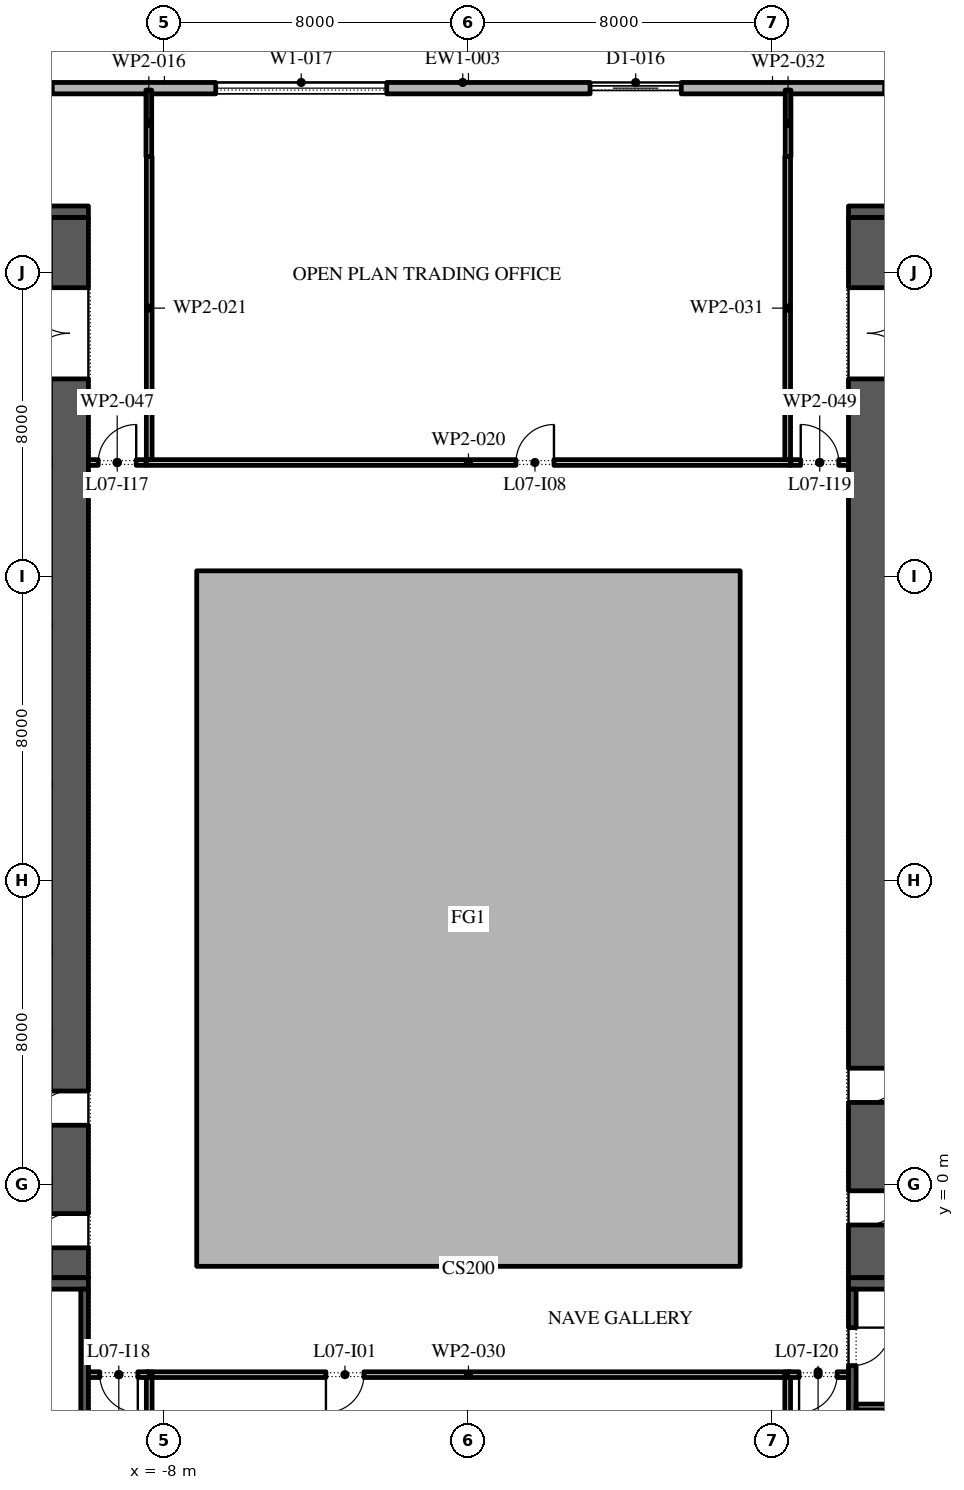
"""IFC4 building model, lengths in metres.
Left out: names, types, materials, properties, quantities, classifications, styles, units other than length and angle.
Written with IfcOpenShell. Run it as: python <this file> out.ifc"""

import sys

from ifc_helpers import new_model, si_unit, direction, frame, frame_2d, origin, place, context, subcontext, project, spatial, polyline, rectangle, outline, extrude, element, fill, save


model = new_model("IFC4")
c1 = context("Model", 3, precision=1e-05, world=origin(), true_north=direction((0.0, 1.0)))
c2 = subcontext(c1, "Body", "Model", "MODEL_VIEW")
j1 = project(units=[si_unit("LENGTHUNIT", "METRE"), si_unit("PLANEANGLEUNIT", "RADIAN")], contexts=[c1])
p1 = place(None, origin())
s1 = spatial("IfcSite", under=j1, at=p1, CompositionType="ELEMENT")
p2 = place(p1, origin())
s2 = spatial("IfcBuilding", under=s1, at=p2, CompositionType="ELEMENT")
p3 = place(p2, frame((0.0, 0.0, 39.6)))
s3 = spatial("IfcBuildingStorey", under=s2, at=p3, CompositionType="ELEMENT", Elevation=39.6)
p4 = place(p3, origin())
e1 = element("IfcWall", 1, at=p4, inside=s3, PredefinedType="STANDARD", context=c2, shape_type="SweptSolid", body=[
    extrude(outline(polyline([(-7.15, -2.15), (7.15, -2.15), (7.15, 16.15), (-7.15, 16.15), (-7.15, -2.15)]), holes=[polyline([(-7.0, -2.0), (-7.0, 16.0), (7.0, 16.0), (7.0, -2.0), (-7.0, -2.0)])]), origin(), (0.0, 0.0, 1.0), 4.0),
])
p5 = place(p3, frame((26.1, 28.85, 0.0), z_axis=(0.0, 0.0, 1.0), x_axis=(-1.0, 0.0, 0.0)))
e2 = element("IfcWall", 2, at=p5, inside=s3, PredefinedType="STANDARD", context=c2, shape_type="SweptSolid", body=[
    extrude(rectangle(XDim=52.5, YDim=0.3, at=frame_2d((26.25, 0.0))), origin(), (0.0, 0.0, 1.0), 4.0),
])
p6 = place(p5, frame((2.0, 0.0, 0.45)))
e3 = element("IfcOpeningElement", 3, at=p6, cuts=e2, PredefinedType="OPENING", context=c2, shape_type="SweptSolid", body=[
    extrude(rectangle(XDim=4.5, YDim=3.05, at=frame_2d((2.25, 1.525))), frame((0.0, 0.16, 0.0), z_axis=(0.0, -1.0, 0.0), x_axis=(1.0, 0.0, 0.0)), (0.0, 0.0, 1.0), 0.32),
])
p7 = place(p5, frame((10.65, 0.0, 0.45)))
e4 = element("IfcOpeningElement", 4, at=p7, cuts=e2, PredefinedType="OPENING", context=c2, shape_type="SweptSolid", body=[
    extrude(rectangle(XDim=4.5, YDim=3.05, at=frame_2d((2.25, 1.525))), frame((0.0, 0.16, 0.0), z_axis=(0.0, -1.0, 0.0), x_axis=(1.0, 0.0, 0.0)), (0.0, 0.0, 1.0), 0.32),
])
p8 = place(p5, frame((20.5, 0.0, 0.0)))
e5 = element("IfcOpeningElement", 5, at=p8, cuts=e2, PredefinedType="OPENING", context=c2, shape_type="SweptSolid", body=[
    extrude(rectangle(XDim=2.4, YDim=3.5, at=frame_2d((1.2, 1.75))), frame((0.0, 0.16, 0.0), z_axis=(0.0, -1.0, 0.0), x_axis=(1.0, 0.0, 0.0)), (0.0, 0.0, 1.0), 0.32),
])
p9 = place(p5, frame((28.25, 0.0, 0.45)))
e6 = element("IfcOpeningElement", 6, at=p9, cuts=e2, PredefinedType="OPENING", context=c2, shape_type="SweptSolid", body=[
    extrude(rectangle(XDim=4.5, YDim=3.05, at=frame_2d((2.25, 1.525))), frame((0.0, 0.16, 0.0), z_axis=(0.0, -1.0, 0.0), x_axis=(1.0, 0.0, 0.0)), (0.0, 0.0, 1.0), 0.32),
])
p10 = place(p5, frame((37.05, 0.0, 0.45)))
e7 = element("IfcOpeningElement", 7, at=p10, cuts=e2, PredefinedType="OPENING", context=c2, shape_type="SweptSolid", body=[
    extrude(rectangle(XDim=4.5, YDim=3.05, at=frame_2d((2.25, 1.525))), frame((0.0, 0.16, 0.0), z_axis=(0.0, -1.0, 0.0), x_axis=(1.0, 0.0, 0.0)), (0.0, 0.0, 1.0), 0.32),
])
p11 = place(p5, frame((45.85, 0.0, 0.45)))
e8 = element("IfcOpeningElement", 8, at=p11, cuts=e2, PredefinedType="OPENING", context=c2, shape_type="SweptSolid", body=[
    extrude(rectangle(XDim=4.5, YDim=3.05, at=frame_2d((2.25, 1.525))), frame((0.0, 0.16, 0.0), z_axis=(0.0, -1.0, 0.0), x_axis=(1.0, 0.0, 0.0)), (0.0, 0.0, 1.0), 0.32),
])
p12 = place(p3, frame((-10.5, -2.45, 0.0), z_axis=(0.0, 0.0, 1.0), x_axis=(0.0, 1.0, 0.0)))
e9 = element("IfcWall", 9, at=p12, inside=s3, PredefinedType="SHEAR", context=c2, shape_type="SweptSolid", body=[
    extrude(rectangle(XDim=27.9, YDim=1.0, at=frame_2d((13.95, 0.0))), origin(), (0.0, 0.0, 1.0), 4.0),
])
p13 = place(p12, frame((23.65, 0.0, 0.0)))
e10 = element("IfcOpeningElement", 10, at=p13, cuts=e9, PredefinedType="OPENING", context=c2, shape_type="SweptSolid", body=[
    extrude(rectangle(XDim=2.4, YDim=2.1, at=frame_2d((1.2, 1.05))), frame((0.0, 0.51, 0.0), z_axis=(0.0, -1.0, 0.0), x_axis=(1.0, 0.0, 0.0)), (0.0, 0.0, 1.0), 1.02),
])
p14 = place(p12, frame((0.788, 0.0, 0.0)))
e11 = element("IfcOpeningElement", 11, at=p14, cuts=e9, PredefinedType="OPENING", context=c2, shape_type="SweptSolid", body=[
    extrude(rectangle(XDim=0.9, YDim=2.1, at=frame_2d((0.45, 1.05))), frame((0.0, 0.51, 0.0), z_axis=(0.0, -1.0, 0.0), x_axis=(1.0, 0.0, 0.0)), (0.0, 0.0, 1.0), 1.02),
])
p15 = place(p12, frame((4.012, 0.0, 0.0)))
e12 = element("IfcOpeningElement", 12, at=p15, cuts=e9, PredefinedType="OPENING", context=c2, shape_type="SweptSolid", body=[
    extrude(rectangle(XDim=0.9, YDim=2.1, at=frame_2d((0.45, 1.05))), frame((0.0, 0.51, 0.0), z_axis=(0.0, -1.0, 0.0), x_axis=(1.0, 0.0, 0.0)), (0.0, 0.0, 1.0), 1.02),
])
for number, where, z_axis, x_axis in (
    (13, (-22.0, -2.6, 0.0), (0.0, 0.0, 1.0), (1.0, 0.0, 0.0)),
    (14, (-22.0, 25.6, 0.0), (0.0, 0.0, 1.0), (1.0, 0.0, 0.0)),
):
    element("IfcWall", number, at=place(p3, frame(where, z_axis=z_axis, x_axis=x_axis)), inside=s3, PredefinedType="SHEAR", context=c2, shape_type="SweptSolid", body=[
        extrude(rectangle(XDim=12.0, YDim=0.3, at=frame_2d((6.0, 0.0))), origin(), (0.0, 0.0, 1.0), 4.0),
    ])
p16 = place(p3, frame((-10.1, -15.8, 0.0), z_axis=(0.0, 0.0, 1.0), x_axis=(0.0, 1.0, 0.0)))
e15 = element("IfcWall", 15, at=p16, inside=s3, PredefinedType="SHEAR", context=c2, shape_type="SweptSolid", body=[
    extrude(rectangle(XDim=13.05, YDim=0.2, at=frame_2d((6.525, 0.0))), origin(), (0.0, 0.0, 1.0), 4.0),
])
p17 = place(p16, frame((6.075, 0.0, 0.0)))
e16 = element("IfcOpeningElement", 16, at=p17, cuts=e15, PredefinedType="OPENING", context=c2, shape_type="SweptSolid", body=[
    extrude(rectangle(XDim=0.9, YDim=2.1, at=frame_2d((0.45, 1.05))), frame((0.0, 0.11, 0.0), z_axis=(0.0, -1.0, 0.0), x_axis=(1.0, 0.0, 0.0)), (0.0, 0.0, 1.0), 0.22),
])
p18 = place(p3, frame((10.5, -2.45, 0.0), z_axis=(0.0, 0.0, 1.0), x_axis=(0.0, 1.0, 0.0)))
e17 = element("IfcWall", 17, at=p18, inside=s3, PredefinedType="SHEAR", context=c2, shape_type="SweptSolid", body=[
    extrude(rectangle(XDim=27.9, YDim=1.0, at=frame_2d((13.95, 0.0))), origin(), (0.0, 0.0, 1.0), 4.0),
])
p19 = place(p18, frame((23.65, 0.0, 0.0)))
e18 = element("IfcOpeningElement", 18, at=p19, cuts=e17, PredefinedType="OPENING", context=c2, shape_type="SweptSolid", body=[
    extrude(rectangle(XDim=2.4, YDim=2.1, at=frame_2d((1.2, 1.05))), frame((0.0, 0.51, 0.0), z_axis=(0.0, -1.0, 0.0), x_axis=(1.0, 0.0, 0.0)), (0.0, 0.0, 1.0), 1.02),
])
p20 = place(p18, frame((1.387, 0.0, 0.0)))
e19 = element("IfcOpeningElement", 19, at=p20, cuts=e17, PredefinedType="OPENING", context=c2, shape_type="SweptSolid", body=[
    extrude(rectangle(XDim=0.9, YDim=2.1, at=frame_2d((0.45, 1.05))), frame((0.0, 0.51, 0.0), z_axis=(0.0, -1.0, 0.0), x_axis=(1.0, 0.0, 0.0)), (0.0, 0.0, 1.0), 1.02),
])
p21 = place(p18, frame((4.613, 0.0, 0.0)))
e20 = element("IfcOpeningElement", 20, at=p21, cuts=e17, PredefinedType="OPENING", context=c2, shape_type="SweptSolid", body=[
    extrude(rectangle(XDim=0.9, YDim=2.1, at=frame_2d((0.45, 1.05))), frame((0.0, 0.51, 0.0), z_axis=(0.0, -1.0, 0.0), x_axis=(1.0, 0.0, 0.0)), (0.0, 0.0, 1.0), 1.02),
])
for number, where, z_axis, x_axis in (
    (21, (10.0, -2.6, 0.0), (0.0, 0.0, 1.0), (1.0, 0.0, 0.0)),
    (22, (10.0, 25.6, 0.0), (0.0, 0.0, 1.0), (1.0, 0.0, 0.0)),
):
    element("IfcWall", number, at=place(p3, frame(where, z_axis=z_axis, x_axis=x_axis)), inside=s3, PredefinedType="SHEAR", context=c2, shape_type="SweptSolid", body=[
        extrude(rectangle(XDim=12.0, YDim=0.3, at=frame_2d((6.0, 0.0))), origin(), (0.0, 0.0, 1.0), 4.0),
    ])
p22 = place(p3, frame((10.1, -15.8, 0.0), z_axis=(0.0, 0.0, 1.0), x_axis=(0.0, 1.0, 0.0)))
e23 = element("IfcWall", 23, at=p22, inside=s3, PredefinedType="SHEAR", context=c2, shape_type="SweptSolid", body=[
    extrude(rectangle(XDim=13.05, YDim=0.2, at=frame_2d((6.525, 0.0))), origin(), (0.0, 0.0, 1.0), 4.0),
])
p23 = place(p22, frame((4.488, 0.0, 0.0)))
e24 = element("IfcOpeningElement", 24, at=p23, cuts=e23, PredefinedType="OPENING", context=c2, shape_type="SweptSolid", body=[
    extrude(rectangle(XDim=0.9, YDim=2.1, at=frame_2d((0.45, 1.05))), frame((0.0, 0.11, 0.0), z_axis=(0.0, -1.0, 0.0), x_axis=(1.0, 0.0, 0.0)), (0.0, 0.0, 1.0), 0.22),
])
p24 = place(p22, frame((11.038, 0.0, 0.0)))
e25 = element("IfcOpeningElement", 25, at=p24, cuts=e23, PredefinedType="OPENING", context=c2, shape_type="SweptSolid", body=[
    extrude(rectangle(XDim=1.0, YDim=2.1, at=frame_2d((0.5, 1.05))), frame((0.0, 0.11, 0.0), z_axis=(0.0, -1.0, 0.0), x_axis=(1.0, 0.0, 0.0)), (0.0, 0.0, 1.0), 0.22),
])
p25 = place(p3, frame((10.2, -5.85, 0.0), z_axis=(0.0, 0.0, 1.0), x_axis=(1.0, 0.0, 0.0)))
e26 = element("IfcWall", 26, at=p25, inside=s3, PredefinedType="PARTITIONING", context=c2, shape_type="SweptSolid", body=[
    extrude(rectangle(XDim=11.6, YDim=0.15, at=frame_2d((5.8, 0.0))), origin(), (0.0, 0.0, 1.0), 4.0),
])
p26 = place(p3, frame((-8.41, 28.8, 0.0), z_axis=(0.0, 0.0, 1.0), x_axis=(0.0, -1.0, 0.0)))
e27 = element("IfcWall", 27, at=p26, inside=s3, PredefinedType="PARTITIONING", context=c2, shape_type="SweptSolid", body=[
    extrude(rectangle(XDim=1.75, YDim=0.15, at=frame_2d((0.875, 0.0))), origin(), (0.0, 0.0, 1.0), 4.0),
])
p27 = place(p3, frame((-8.4, -4.925, 0.0), z_axis=(0.0, 0.0, 1.0), x_axis=(0.0, -1.0, 0.0)))
e28 = element("IfcWall", 28, at=p27, inside=s3, PredefinedType="PARTITIONING", context=c2, shape_type="SweptSolid", body=[
    extrude(rectangle(XDim=5.195, YDim=0.15, at=frame_2d((2.598, 0.0))), origin(), (0.0, 0.0, 1.0), 4.0),
])
p28 = place(p3, frame((-8.475, 19.0, 0.0), z_axis=(0.0, 0.0, 1.0), x_axis=(1.0, 0.0, 0.0)))
e29 = element("IfcWall", 29, at=p28, inside=s3, PredefinedType="PARTITIONING", context=c2, shape_type="SweptSolid", body=[
    extrude(rectangle(XDim=16.95, YDim=0.15, at=frame_2d((8.475, 0.0))), origin(), (0.0, 0.0, 1.0), 4.0),
])
p29 = place(p28, frame((9.725, 0.0, 0.0)))
e30 = element("IfcOpeningElement", 30, at=p29, cuts=e29, PredefinedType="OPENING", context=c2, shape_type="SweptSolid", body=[
    extrude(rectangle(XDim=1.0, YDim=2.1, at=frame_2d((0.5, 1.05))), frame((0.0, 0.085, 0.0), z_axis=(0.0, -1.0, 0.0), x_axis=(1.0, 0.0, 0.0)), (0.0, 0.0, 1.0), 0.17),
])
p30 = place(p3, frame((-8.4, 27.05, 0.0), z_axis=(0.0, 0.0, 1.0), x_axis=(0.0, -1.0, 0.0)))
e31 = element("IfcWall", 31, at=p30, inside=s3, PredefinedType="PARTITIONING", context=c2, shape_type="SweptSolid", body=[
    extrude(rectangle(XDim=7.975, YDim=0.15, at=frame_2d((3.988, 0.0))), origin(), (0.0, 0.0, 1.0), 4.0),
])
p31 = place(p3, frame((8.4, -10.12, 0.0), z_axis=(0.0, 0.0, 1.0), x_axis=(0.0, 1.0, 0.0)))
e32 = element("IfcWall", 32, at=p31, inside=s3, PredefinedType="PARTITIONING", context=c2, shape_type="SweptSolid", body=[
    extrude(rectangle(XDim=5.195, YDim=0.15, at=frame_2d((2.598, 0.0))), origin(), (0.0, 0.0, 1.0), 4.0),
])
p32 = place(p3, frame((8.325, -5.0, 0.0), z_axis=(0.0, 0.0, 1.0), x_axis=(-1.0, 0.0, 0.0)))
e33 = element("IfcWall", 33, at=p32, inside=s3, PredefinedType="PARTITIONING", context=c2, shape_type="SweptSolid", body=[
    extrude(rectangle(XDim=16.65, YDim=0.15, at=frame_2d((8.325, 0.0))), origin(), (0.0, 0.0, 1.0), 4.0),
])
p33 = place(p32, frame((11.075, 0.0, 0.0)))
e34 = element("IfcOpeningElement", 34, at=p33, cuts=e33, PredefinedType="OPENING", context=c2, shape_type="SweptSolid", body=[
    extrude(rectangle(XDim=1.0, YDim=2.1, at=frame_2d((0.5, 1.05))), frame((0.0, 0.085, 0.0), z_axis=(0.0, -1.0, 0.0), x_axis=(1.0, 0.0, 0.0)), (0.0, 0.0, 1.0), 0.17),
])
p34 = place(p3, frame((8.4, 19.075, 0.0), z_axis=(0.0, 0.0, 1.0), x_axis=(0.0, 1.0, 0.0)))
e35 = element("IfcWall", 35, at=p34, inside=s3, PredefinedType="PARTITIONING", context=c2, shape_type="SweptSolid", body=[
    extrude(rectangle(XDim=7.975, YDim=0.15, at=frame_2d((3.988, 0.0))), origin(), (0.0, 0.0, 1.0), 4.0),
])
p35 = place(p3, frame((8.41, 27.05, 0.0), z_axis=(0.0, 0.0, 1.0), x_axis=(0.0, 1.0, 0.0)))
e36 = element("IfcWall", 36, at=p35, inside=s3, PredefinedType="PARTITIONING", context=c2, shape_type="SweptSolid", body=[
    extrude(rectangle(XDim=1.75, YDim=0.15, at=frame_2d((0.875, 0.0))), origin(), (0.0, 0.0, 1.0), 4.0),
])
p36 = place(p3, frame((-10.0, 19.0, 0.0), z_axis=(0.0, 0.0, 1.0), x_axis=(1.0, 0.0, 0.0)))
e37 = element("IfcWall", 37, at=p36, inside=s3, PredefinedType="PARTITIONING", context=c2, shape_type="SweptSolid", body=[
    extrude(rectangle(XDim=1.515, YDim=0.15, at=frame_2d((0.757, 0.0))), origin(), (0.0, 0.0, 1.0), 4.0),
])
p37 = place(p36, frame((0.258, 0.0, 0.0)))
e38 = element("IfcOpeningElement", 38, at=p37, cuts=e37, PredefinedType="OPENING", context=c2, shape_type="SweptSolid", body=[
    extrude(rectangle(XDim=1.0, YDim=2.1, at=frame_2d((0.5, 1.05))), frame((0.0, 0.085, 0.0), z_axis=(0.0, -1.0, 0.0), x_axis=(1.0, 0.0, 0.0)), (0.0, 0.0, 1.0), 0.17),
])
p38 = place(p3, frame((-8.4, -5.0, 0.0), z_axis=(0.0, 0.0, 1.0), x_axis=(-1.0, 0.0, 0.0)))
e39 = element("IfcWall", 39, at=p38, inside=s3, PredefinedType="PARTITIONING", context=c2, shape_type="SweptSolid", body=[
    extrude(rectangle(XDim=1.6, YDim=0.15, at=frame_2d((0.8, 0.0))), origin(), (0.0, 0.0, 1.0), 4.0),
])
p39 = place(p38, frame((0.3, 0.0, 0.0)))
e40 = element("IfcOpeningElement", 40, at=p39, cuts=e39, PredefinedType="OPENING", context=c2, shape_type="SweptSolid", body=[
    extrude(rectangle(XDim=1.0, YDim=2.1, at=frame_2d((0.5, 1.05))), frame((0.0, 0.085, 0.0), z_axis=(0.0, -1.0, 0.0), x_axis=(1.0, 0.0, 0.0)), (0.0, 0.0, 1.0), 0.17),
])
p40 = place(p3, frame((8.485, 19.0, 0.0), z_axis=(0.0, 0.0, 1.0), x_axis=(1.0, 0.0, 0.0)))
e41 = element("IfcWall", 41, at=p40, inside=s3, PredefinedType="PARTITIONING", context=c2, shape_type="SweptSolid", body=[
    extrude(rectangle(XDim=1.515, YDim=0.15, at=frame_2d((0.757, 0.0))), origin(), (0.0, 0.0, 1.0), 4.0),
])
p41 = place(p40, frame((0.258, 0.0, 0.0)))
e42 = element("IfcOpeningElement", 42, at=p41, cuts=e41, PredefinedType="OPENING", context=c2, shape_type="SweptSolid", body=[
    extrude(rectangle(XDim=1.0, YDim=2.1, at=frame_2d((0.5, 1.05))), frame((0.0, 0.085, 0.0), z_axis=(0.0, -1.0, 0.0), x_axis=(1.0, 0.0, 0.0)), (0.0, 0.0, 1.0), 0.17),
])
p42 = place(p3, frame((10.0, -5.0, 0.0), z_axis=(0.0, 0.0, 1.0), x_axis=(-1.0, 0.0, 0.0)))
e43 = element("IfcWall", 43, at=p42, inside=s3, PredefinedType="PARTITIONING", context=c2, shape_type="SweptSolid", body=[
    extrude(rectangle(XDim=1.6, YDim=0.15, at=frame_2d((0.8, 0.0))), origin(), (0.0, 0.0, 1.0), 4.0),
])
p43 = place(p42, frame((0.3, 0.0, 0.0)))
e44 = element("IfcOpeningElement", 44, at=p43, cuts=e43, PredefinedType="OPENING", context=c2, shape_type="SweptSolid", body=[
    extrude(rectangle(XDim=1.0, YDim=2.1, at=frame_2d((0.5, 1.05))), frame((0.0, 0.085, 0.0), z_axis=(0.0, -1.0, 0.0), x_axis=(1.0, 0.0, 0.0)), (0.0, 0.0, 1.0), 0.17),
])
p44 = place(p8, origin())
e45 = element("IfcDoor", 45, at=p44, inside=s3, OperationType="DOUBLE_DOOR_SLIDING", PredefinedType="DOOR", context=c2, shape_type="SweptSolid", body=[
    extrude(rectangle(XDim=2.4, YDim=3.5, at=frame_2d((1.2, 1.75))), frame((0.0, 0.025, 0.0), z_axis=(0.0, -1.0, 0.0), x_axis=(1.0, 0.0, 0.0)), (0.0, 0.0, 1.0), 0.05),
])
fill(e5, e45)
p45 = place(p9, origin())
e46 = element("IfcWindow", 46, at=p45, inside=s3, PartitioningType="DOUBLE_PANEL_VERTICAL", PredefinedType="WINDOW", context=c2, shape_type="SweptSolid", body=[
    extrude(rectangle(XDim=4.5, YDim=3.05, at=frame_2d((2.25, 1.525))), frame((0.0, 0.03, 0.0), z_axis=(0.0, -1.0, 0.0), x_axis=(1.0, 0.0, 0.0)), (0.0, 0.0, 1.0), 0.06),
])
fill(e6, e46)
p46 = place(p13, origin())
e47 = element("IfcDoor", 47, at=p46, inside=s3, OperationType="DOUBLE_DOOR_SINGLE_SWING", PredefinedType="DOOR", context=c2, shape_type="SweptSolid", body=[
    extrude(rectangle(XDim=2.4, YDim=2.1, at=frame_2d((1.2, 1.05))), frame((0.0, 0.025, 0.0), z_axis=(0.0, -1.0, 0.0), x_axis=(1.0, 0.0, 0.0)), (0.0, 0.0, 1.0), 0.05),
])
fill(e10, e47)
p47 = place(p19, frame((2.4, 0.0, 0.0), z_axis=(0.0, 0.0, 1.0), x_axis=(-1.0, 0.0, 0.0)))
e48 = element("IfcDoor", 48, at=p47, inside=s3, OperationType="DOUBLE_DOOR_SINGLE_SWING", PredefinedType="DOOR", context=c2, shape_type="SweptSolid", body=[
    extrude(rectangle(XDim=2.4, YDim=2.1, at=frame_2d((1.2, 1.05))), frame((0.0, 0.025, 0.0), z_axis=(0.0, -1.0, 0.0), x_axis=(1.0, 0.0, 0.0)), (0.0, 0.0, 1.0), 0.05),
])
fill(e18, e48)
p48 = place(p24, frame((1.0, -0.15, 0.0), z_axis=(0.0, 0.0, 1.0), x_axis=(-1.0, 0.0, 0.0)))
e49 = element("IfcDoor", 49, at=p48, inside=s3, OperationType="SINGLE_SWING_RIGHT", PredefinedType="DOOR", context=c2, shape_type="SweptSolid", body=[
    extrude(rectangle(XDim=1.0, YDim=2.1, at=frame_2d((0.5, 1.05))), frame((0.0, -0.05, 0.0), z_axis=(0.0, -1.0, 0.0), x_axis=(1.0, 0.0, 0.0)), (0.0, 0.0, 1.0), 0.05),
])
fill(e25, e49)
p49 = place(p33, origin())
e50 = element("IfcDoor", 50, at=p49, inside=s3, OperationType="SINGLE_SWING_LEFT", PredefinedType="DOOR", context=c2, shape_type="SweptSolid", body=[
    extrude(rectangle(XDim=1.0, YDim=2.1, at=frame_2d((0.5, 1.05))), frame((0.0, 0.025, 0.0), z_axis=(0.0, -1.0, 0.0), x_axis=(1.0, 0.0, 0.0)), (0.0, 0.0, 1.0), 0.05),
])
fill(e34, e50)
p50 = place(p29, origin())
e51 = element("IfcDoor", 51, at=p50, inside=s3, OperationType="SINGLE_SWING_LEFT", PredefinedType="DOOR", context=c2, shape_type="SweptSolid", body=[
    extrude(rectangle(XDim=1.0, YDim=2.1, at=frame_2d((0.5, 1.05))), frame((0.0, 0.025, 0.0), z_axis=(0.0, -1.0, 0.0), x_axis=(1.0, 0.0, 0.0)), (0.0, 0.0, 1.0), 0.05),
])
fill(e30, e51)
p51 = place(p37, origin())
e52 = element("IfcDoor", 52, at=p51, inside=s3, OperationType="SINGLE_SWING_LEFT", PredefinedType="DOOR", context=c2, shape_type="SweptSolid", body=[
    extrude(rectangle(XDim=1.0, YDim=2.1, at=frame_2d((0.5, 1.05))), frame((0.0, 0.025, 0.0), z_axis=(0.0, -1.0, 0.0), x_axis=(1.0, 0.0, 0.0)), (0.0, 0.0, 1.0), 0.05),
])
fill(e38, e52)
p52 = place(p39, origin())
e53 = element("IfcDoor", 53, at=p52, inside=s3, OperationType="SINGLE_SWING_RIGHT", PredefinedType="DOOR", context=c2, shape_type="SweptSolid", body=[
    extrude(rectangle(XDim=1.0, YDim=2.1, at=frame_2d((0.5, 1.05))), frame((0.0, 0.025, 0.0), z_axis=(0.0, -1.0, 0.0), x_axis=(1.0, 0.0, 0.0)), (0.0, 0.0, 1.0), 0.05),
])
fill(e40, e53)
p53 = place(p41, origin())
e54 = element("IfcDoor", 54, at=p53, inside=s3, OperationType="SINGLE_SWING_RIGHT", PredefinedType="DOOR", context=c2, shape_type="SweptSolid", body=[
    extrude(rectangle(XDim=1.0, YDim=2.1, at=frame_2d((0.5, 1.05))), frame((0.0, 0.025, 0.0), z_axis=(0.0, -1.0, 0.0), x_axis=(1.0, 0.0, 0.0)), (0.0, 0.0, 1.0), 0.05),
])
fill(e42, e54)
p54 = place(p43, origin())
e55 = element("IfcDoor", 55, at=p54, inside=s3, OperationType="SINGLE_SWING_LEFT", PredefinedType="DOOR", context=c2, shape_type="SweptSolid", body=[
    extrude(rectangle(XDim=1.0, YDim=2.1, at=frame_2d((0.5, 1.05))), frame((0.0, 0.025, 0.0), z_axis=(0.0, -1.0, 0.0), x_axis=(1.0, 0.0, 0.0)), (0.0, 0.0, 1.0), 0.05),
])
fill(e44, e55)
save(model, sys.argv[1])
